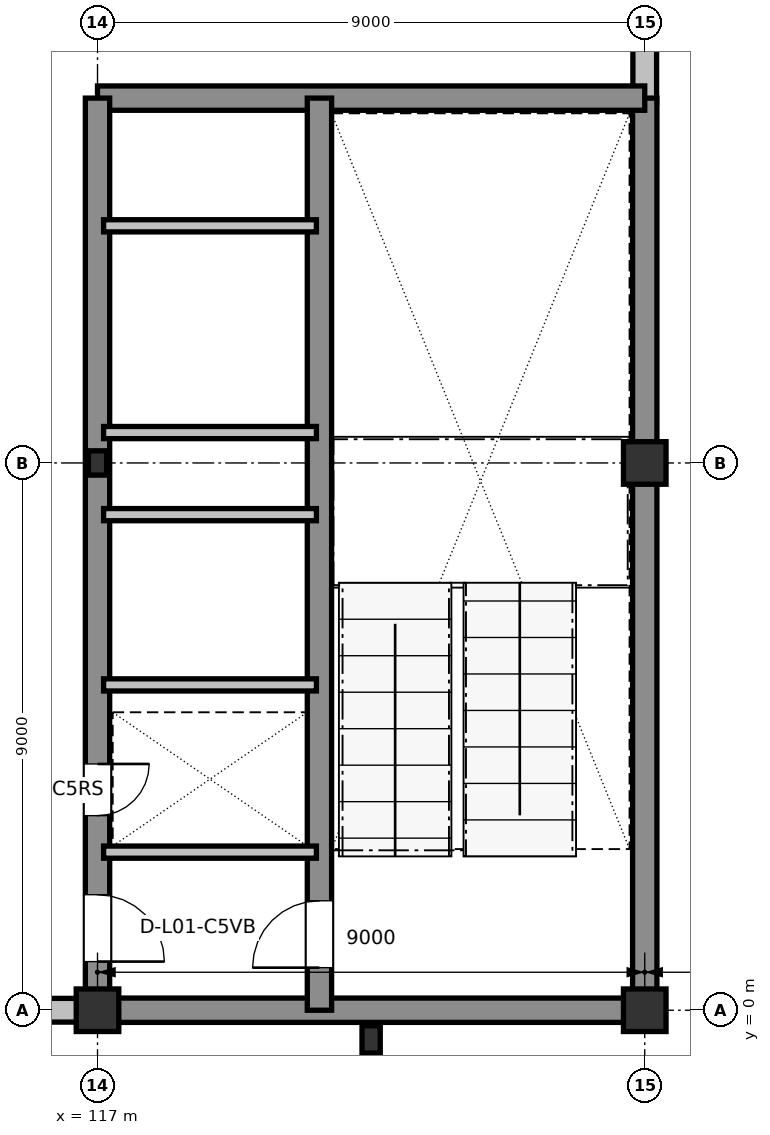
"""IFC4 building model, lengths in metres.
Left out: names, types, materials, properties, quantities, classifications, styles, units other than length and angle.
Written with IfcOpenShell. Run it as: python <this file> out.ifc"""

import sys

from ifc_helpers import new_model, si_unit, direction, frame, frame_2d, origin, origin_2d, place, context, subcontext, project, spatial, rectangle, i_section, extrude, element, fill, save


model = new_model("IFC4")
c1 = context("Model", 3, precision=1e-05, world=origin(), true_north=direction((0.0, 1.0)))
c2 = subcontext(c1, "Body", "Model", "MODEL_VIEW")
j1 = project(units=[si_unit("LENGTHUNIT", "METRE"), si_unit("PLANEANGLEUNIT", "RADIAN")], contexts=[c1])
p1 = place(None, origin())
s1 = spatial("IfcSite", under=j1, at=p1, CompositionType="ELEMENT")
p2 = place(p1, origin())
s2 = spatial("IfcBuilding", under=s1, at=p2, CompositionType="ELEMENT")
p3 = place(p2, frame((0.0, 0.0, 5.4)))
s3 = spatial("IfcBuildingStorey", under=s2, at=p3, CompositionType="ELEMENT", Elevation=5.4)
p4 = place(p3, frame((121.5, -0.48, 0.0), z_axis=(0.0, 0.0, 1.0), x_axis=(1.0, 0.0, 0.0)))
e1 = element("IfcColumn", 1, at=p4, inside=s3, PredefinedType="PILASTER", context=c2, shape_type="SweptSolid", body=[
    extrude(rectangle(XDim=0.3, YDim=0.45, at=origin_2d()), origin(), (0.0, 0.0, 1.0), 4.8),
])
p5 = place(p3, frame((117.0, 0.0, 0.0), z_axis=(0.0, 0.0, 1.0), x_axis=(1.0, 0.0, 0.0)))
e2 = element("IfcColumn", 2, at=p5, inside=s3, PredefinedType="COLUMN", context=c2, shape_type="SweptSolid", body=[
    extrude(rectangle(XDim=0.7, YDim=0.7, at=origin_2d()), origin(), (0.0, 0.0, 1.0), 4.8),
])
p6 = place(p3, frame((117.0, 9.0, 0.0), z_axis=(0.0, 0.0, 1.0), x_axis=(1.0, 0.0, 0.0)))
e3 = element("IfcColumn", 3, at=p6, inside=s3, PredefinedType="COLUMN", context=c2, shape_type="SweptSolid", body=[
    extrude(i_section(OverallWidth=0.3, OverallDepth=0.4, WebThickness=0.013, FlangeThickness=0.024, at=origin_2d()), origin(), (0.0, 0.0, 1.0), 4.8),
])
for number, where, z_axis, x_axis in (
    (4, (126.0, 0.0, 0.0), (0.0, 0.0, 1.0), (1.0, 0.0, 0.0)),
    (5, (126.0, 9.0, 0.0), (0.0, 0.0, 1.0), (1.0, 0.0, 0.0)),
):
    element("IfcColumn", number, at=place(p3, frame(where, z_axis=z_axis, x_axis=x_axis)), inside=s3, PredefinedType="COLUMN", context=c2, shape_type="SweptSolid", body=[
        extrude(rectangle(XDim=0.7, YDim=0.7, at=origin_2d()), origin(), (0.0, 0.0, 1.0), 4.8),
    ])
p7 = place(p3, frame((108.335, 0.0, 0.0), z_axis=(0.0, 0.0, 1.0), x_axis=(1.0, 0.0, 0.0)))
e6 = element("IfcWall", 6, at=p7, inside=s3, PredefinedType="STANDARD", context=c2, shape_type="SweptSolid", body=[
    extrude(rectangle(XDim=8.33, YDim=0.39, at=frame_2d((4.165, 0.0))), origin(), (0.0, 0.0, 1.0), 4.195),
])
p8 = place(p7, frame((2.915, 0.0, 0.9)))
e7 = element("IfcOpeningElement", 7, at=p8, cuts=e6, PredefinedType="OPENING", context=c2, shape_type="SweptSolid", body=[
    extrude(rectangle(XDim=2.5, YDim=1.75, at=frame_2d((1.25, 0.875))), frame((0.0, 0.205, 0.0), z_axis=(0.0, -1.0, 0.0), x_axis=(1.0, 0.0, 0.0)), (0.0, 0.0, 1.0), 0.41),
])
p9 = place(p3, frame((126.0, 14.925, 0.0), z_axis=(0.0, 0.0, 1.0), x_axis=(0.0, 1.0, 0.0)))
e8 = element("IfcWall", 8, at=p9, inside=s3, PredefinedType="STANDARD", context=c2, shape_type="SweptSolid", body=[
    extrude(rectangle(XDim=2.74, YDim=0.39, at=frame_2d((1.37, 0.0))), origin(), (0.0, 0.0, 1.0), 4.195),
])
p10 = place(p3, frame((117.0, 0.0, 0.0), z_axis=(0.0, 0.0, 1.0), x_axis=(1.0, 0.0, 0.0)))
e9 = element("IfcWall", 9, at=p10, inside=s3, PredefinedType="SHEAR", context=c2, shape_type="SweptSolid", body=[
    extrude(rectangle(XDim=9.0, YDim=0.4, at=frame_2d((4.5, 0.0))), origin(), (0.0, 0.0, 1.0), 4.56),
])
p11 = place(p3, frame((126.0, 0.0, 0.0), z_axis=(0.0, 0.0, 1.0), x_axis=(0.0, 1.0, 0.0)))
e10 = element("IfcWall", 10, at=p11, inside=s3, PredefinedType="SHEAR", context=c2, shape_type="SweptSolid", body=[
    extrude(rectangle(XDim=15.0, YDim=0.4, at=frame_2d((7.5, 0.0))), origin(), (0.0, 0.0, 1.0), 4.56),
])
p12 = place(p3, frame((126.0, 15.0, 0.0), z_axis=(0.0, 0.0, 1.0), x_axis=(-1.0, 0.0, 0.0)))
e11 = element("IfcWall", 11, at=p12, inside=s3, PredefinedType="SHEAR", context=c2, shape_type="SweptSolid", body=[
    extrude(rectangle(XDim=9.0, YDim=0.4, at=frame_2d((4.5, 0.0))), origin(), (0.0, 0.0, 1.0), 4.56),
])
p13 = place(p3, frame((117.0, 15.0, 0.0), z_axis=(0.0, 0.0, 1.0), x_axis=(0.0, -1.0, 0.0)))
e12 = element("IfcWall", 12, at=p13, inside=s3, PredefinedType="SHEAR", context=c2, shape_type="SweptSolid", body=[
    extrude(rectangle(XDim=15.0, YDim=0.4, at=frame_2d((7.5, 0.0))), origin(), (0.0, 0.0, 1.0), 4.56),
])
p14 = place(p13, frame((13.1, 0.0, 0.0)))
e13 = element("IfcOpeningElement", 13, at=p14, cuts=e12, PredefinedType="OPENING", context=c2, shape_type="SweptSolid", body=[
    extrude(rectangle(XDim=1.1, YDim=2.16, at=frame_2d((0.55, 1.08))), frame((0.0, 0.21, 0.0), z_axis=(0.0, -1.0, 0.0), x_axis=(1.0, 0.0, 0.0)), (0.0, 0.0, 1.0), 0.42),
])
p15 = place(p13, frame((10.95, 0.0, 0.0)))
e14 = element("IfcOpeningElement", 14, at=p15, cuts=e12, PredefinedType="OPENING", context=c2, shape_type="SweptSolid", body=[
    extrude(rectangle(XDim=0.85, YDim=2.1, at=frame_2d((0.425, 1.05))), frame((0.0, 0.21, 0.0), z_axis=(0.0, -1.0, 0.0), x_axis=(1.0, 0.0, 0.0)), (0.0, 0.0, 1.0), 0.42),
])
p16 = place(p3, frame((120.65, 0.0, 0.0), z_axis=(0.0, 0.0, 1.0), x_axis=(0.0, 1.0, 0.0)))
e15 = element("IfcWall", 15, at=p16, inside=s3, PredefinedType="SHEAR", context=c2, shape_type="SweptSolid", body=[
    extrude(rectangle(XDim=15.0, YDim=0.4, at=frame_2d((7.5, 0.0))), origin(), (0.0, 0.0, 1.0), 4.56),
])
p17 = place(p16, frame((0.7, 0.0, 0.0)))
e16 = element("IfcOpeningElement", 16, at=p17, cuts=e15, PredefinedType="OPENING", context=c2, shape_type="SweptSolid", body=[
    extrude(rectangle(XDim=1.1, YDim=2.16, at=frame_2d((0.55, 1.08))), frame((0.0, 0.21, 0.0), z_axis=(0.0, -1.0, 0.0), x_axis=(1.0, 0.0, 0.0)), (0.0, 0.0, 1.0), 0.42),
])
for number, where, z_axis, x_axis in (
    (17, (117.1, 2.6, 0.0), (0.0, 0.0, 1.0), (1.0, 0.0, 0.0)),
    (18, (117.1, 5.35, 0.0), (0.0, 0.0, 1.0), (1.0, 0.0, 0.0)),
    (19, (117.1, 8.15, 0.0), (0.0, 0.0, 1.0), (1.0, 0.0, 0.0)),
    (20, (117.1, 9.5, 0.0), (0.0, 0.0, 1.0), (1.0, 0.0, 0.0)),
    (21, (117.1, 12.9, 0.0), (0.0, 0.0, 1.0), (1.0, 0.0, 0.0)),
):
    element("IfcWall", number, at=place(p3, frame(where, z_axis=z_axis, x_axis=x_axis)), inside=s3, PredefinedType="PARTITIONING", context=c2, shape_type="SweptSolid", body=[
        extrude(rectangle(XDim=3.5, YDim=0.2, at=frame_2d((1.75, 0.0))), origin(), (0.0, 0.0, 1.0), 4.56),
    ])
p18 = place(p17, origin())
e22 = element("IfcDoor", 22, at=p18, inside=s3, OperationType="SINGLE_SWING_LEFT", PredefinedType="DOOR", context=c2, shape_type="SweptSolid", body=[
    extrude(rectangle(XDim=1.1, YDim=2.16, at=frame_2d((0.55, 1.08))), frame((0.0, 0.025, 0.0), z_axis=(0.0, -1.0, 0.0), x_axis=(1.0, 0.0, 0.0)), (0.0, 0.0, 1.0), 0.05),
])
fill(e16, e22)
p19 = place(p14, origin())
e23 = element("IfcDoor", 23, at=p19, inside=s3, OperationType="SINGLE_SWING_RIGHT", PredefinedType="DOOR", context=c2, shape_type="SweptSolid", body=[
    extrude(rectangle(XDim=1.1, YDim=2.16, at=frame_2d((0.55, 1.08))), frame((0.0, 0.025, 0.0), z_axis=(0.0, -1.0, 0.0), x_axis=(1.0, 0.0, 0.0)), (0.0, 0.0, 1.0), 0.05),
])
fill(e13, e23)
p20 = place(p15, origin())
e24 = element("IfcDoor", 24, at=p20, inside=s3, OperationType="SINGLE_SWING_LEFT", PredefinedType="DOOR", context=c2, shape_type="SweptSolid", body=[
    extrude(rectangle(XDim=0.85, YDim=2.1, at=frame_2d((0.425, 1.05))), frame((0.0, 0.025, 0.0), z_axis=(0.0, -1.0, 0.0), x_axis=(1.0, 0.0, 0.0)), (0.0, 0.0, 1.0), 0.05),
])
fill(e14, e24)
save(model, sys.argv[1])
